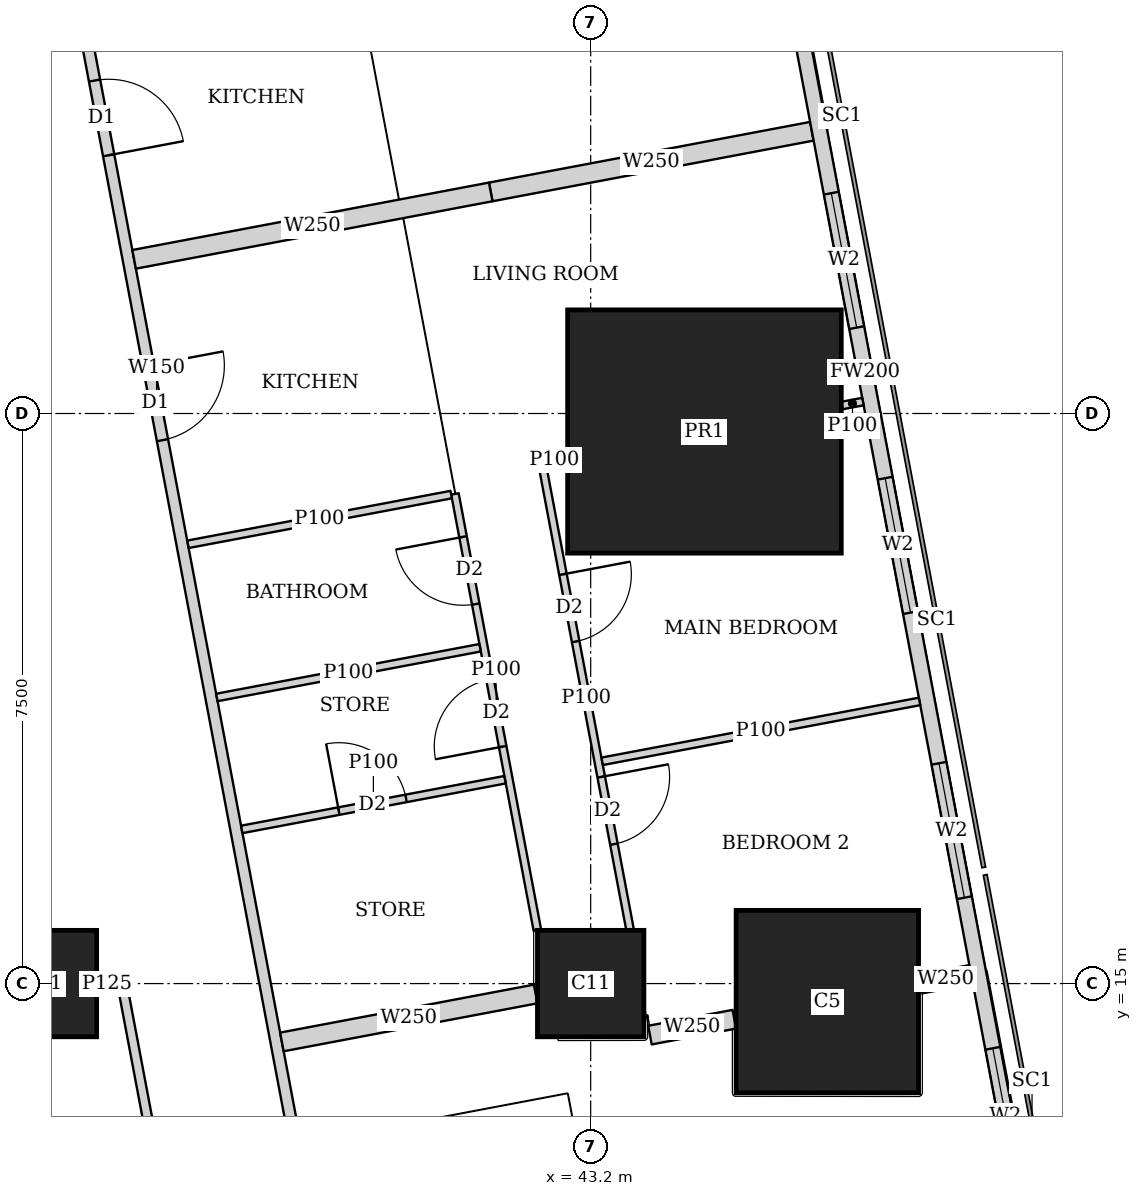
"""IFC4 building model, lengths in metres.
Left out: names, types, materials, properties, quantities, classifications, styles, units other than length and angle.
Written with IfcOpenShell. Run it as: python <this file> out.ifc"""

import sys

from ifc_helpers import new_model, si_unit, direction, frame, frame_2d, origin, origin_2d, place, context, subcontext, project, spatial, rectangle, extrude, element, fill, save


model = new_model("IFC4")
c1 = context("Model", 3, precision=1e-05, world=origin(), true_north=direction((0.0, 1.0)))
c2 = subcontext(c1, "Body", "Model", "MODEL_VIEW")
j1 = project(units=[si_unit("LENGTHUNIT", "METRE"), si_unit("PLANEANGLEUNIT", "RADIAN")], contexts=[c1])
p1 = place(None, origin())
s1 = spatial("IfcSite", under=j1, at=p1, CompositionType="ELEMENT")
p2 = place(p1, origin())
s2 = spatial("IfcBuilding", under=s1, at=p2, CompositionType="ELEMENT")
p3 = place(p2, frame((0.0, 0.0, 227.45)))
s3 = spatial("IfcBuildingStorey", under=s2, at=p3, CompositionType="ELEMENT", Elevation=227.45)
for number, where, z_axis, x_axis in (
    (1, (36.0, 15.0, 0.0), (0.0, 0.0, 1.0), (1.0, 0.0, 0.0)),
    (2, (43.2, 15.0, 0.0), (0.0, 0.0, 1.0), (1.0, 0.0, 0.0)),
):
    element("IfcColumn", number, at=place(p3, frame(where, z_axis=z_axis, x_axis=x_axis)), inside=s3, PredefinedType="COLUMN", context=c2, shape_type="SweptSolid", body=[
        extrude(rectangle(XDim=1.4, YDim=1.4, at=origin_2d()), origin(), (0.0, 0.0, 1.0), 3.75),
    ])
p4 = place(p3, frame((46.314, 14.763, 0.0), z_axis=(0.0, 0.0, 1.0), x_axis=(1.0, 0.0, 0.0)))
e3 = element("IfcColumn", 3, at=p4, inside=s3, PredefinedType="COLUMN", context=c2, shape_type="SweptSolid", body=[
    extrude(rectangle(XDim=2.4, YDim=2.4, at=origin_2d()), origin(), (0.0, 0.0, 1.0), 3.75),
])
p5 = place(p3, frame((44.697, 22.263, 0.0), z_axis=(0.0, 0.0, 1.0), x_axis=(1.0, 0.0, 0.0)))
e4 = element("IfcColumn", 4, at=p5, inside=s3, PredefinedType="COLUMN", context=c2, shape_type="SweptSolid", body=[
    extrude(rectangle(XDim=3.6, YDim=3.2, at=origin_2d()), origin(), (0.0, 0.0, 1.0), 3.75),
])
p6 = place(p3, frame((50.653, 2.703, 0.0), z_axis=(0.0, 0.0, 1.0), x_axis=(-0.185612026696, 0.982623109613, 0.0)))
e5 = element("IfcWall", 5, at=p6, inside=s3, PredefinedType="SOLIDWALL", context=c2, shape_type="SweptSolid", body=[
    extrude(rectangle(XDim=41.393, YDim=0.2, at=frame_2d((20.697, 0.0))), origin(), (0.0, 0.0, 1.0), 3.5),
])
p7 = place(p6, frame((1.633, 0.0, 0.9)))
e6 = element("IfcOpeningElement", 6, at=p7, cuts=e5, PredefinedType="OPENING", context=c2, shape_type="SweptSolid", body=[
    extrude(rectangle(XDim=1.8, YDim=1.5, at=frame_2d((0.9, 0.75))), frame((0.0, 0.11, 0.0), z_axis=(0.0, -1.0, 0.0), x_axis=(1.0, 0.0, 0.0)), (0.0, 0.0, 1.0), 0.22),
])
p8 = place(p6, frame((6.032, 0.0, 0.9)))
e7 = element("IfcOpeningElement", 7, at=p8, cuts=e5, PredefinedType="OPENING", context=c2, shape_type="SweptSolid", body=[
    extrude(rectangle(XDim=1.8, YDim=1.5, at=frame_2d((0.9, 0.75))), frame((0.0, 0.11, 0.0), z_axis=(0.0, -1.0, 0.0), x_axis=(1.0, 0.0, 0.0)), (0.0, 0.0, 1.0), 0.22),
])
p9 = place(p6, frame((9.848, 0.0, 0.9)))
e8 = element("IfcOpeningElement", 8, at=p9, cuts=e5, PredefinedType="OPENING", context=c2, shape_type="SweptSolid", body=[
    extrude(rectangle(XDim=1.8, YDim=1.5, at=frame_2d((0.9, 0.75))), frame((0.0, 0.11, 0.0), z_axis=(0.0, -1.0, 0.0), x_axis=(1.0, 0.0, 0.0)), (0.0, 0.0, 1.0), 0.22),
])
p10 = place(p6, frame((13.664, 0.0, 0.9)))
e9 = element("IfcOpeningElement", 9, at=p10, cuts=e5, PredefinedType="OPENING", context=c2, shape_type="SweptSolid", body=[
    extrude(rectangle(XDim=1.8, YDim=1.5, at=frame_2d((0.9, 0.75))), frame((0.0, 0.11, 0.0), z_axis=(0.0, -1.0, 0.0), x_axis=(1.0, 0.0, 0.0)), (0.0, 0.0, 1.0), 0.22),
])
p11 = place(p6, frame((17.481, 0.0, 0.9)))
e10 = element("IfcOpeningElement", 10, at=p11, cuts=e5, PredefinedType="OPENING", context=c2, shape_type="SweptSolid", body=[
    extrude(rectangle(XDim=1.8, YDim=1.5, at=frame_2d((0.9, 0.75))), frame((0.0, 0.11, 0.0), z_axis=(0.0, -1.0, 0.0), x_axis=(1.0, 0.0, 0.0)), (0.0, 0.0, 1.0), 0.22),
])
p12 = place(p6, frame((21.297, 0.0, 0.9)))
e11 = element("IfcOpeningElement", 11, at=p12, cuts=e5, PredefinedType="OPENING", context=c2, shape_type="SweptSolid", body=[
    extrude(rectangle(XDim=1.8, YDim=1.5, at=frame_2d((0.9, 0.75))), frame((0.0, 0.11, 0.0), z_axis=(0.0, -1.0, 0.0), x_axis=(1.0, 0.0, 0.0)), (0.0, 0.0, 1.0), 0.22),
])
p13 = place(p6, frame((25.113, 0.0, 0.9)))
e12 = element("IfcOpeningElement", 12, at=p13, cuts=e5, PredefinedType="OPENING", context=c2, shape_type="SweptSolid", body=[
    extrude(rectangle(XDim=1.8, YDim=1.5, at=frame_2d((0.9, 0.75))), frame((0.0, 0.11, 0.0), z_axis=(0.0, -1.0, 0.0), x_axis=(1.0, 0.0, 0.0)), (0.0, 0.0, 1.0), 0.22),
])
p14 = place(p6, frame((28.93, 0.0, 0.9)))
e13 = element("IfcOpeningElement", 13, at=p14, cuts=e5, PredefinedType="OPENING", context=c2, shape_type="SweptSolid", body=[
    extrude(rectangle(XDim=1.8, YDim=1.5, at=frame_2d((0.9, 0.75))), frame((0.0, 0.11, 0.0), z_axis=(0.0, -1.0, 0.0), x_axis=(1.0, 0.0, 0.0)), (0.0, 0.0, 1.0), 0.22),
])
p15 = place(p6, frame((32.746, 0.0, 0.9)))
e14 = element("IfcOpeningElement", 14, at=p15, cuts=e5, PredefinedType="OPENING", context=c2, shape_type="SweptSolid", body=[
    extrude(rectangle(XDim=1.8, YDim=1.5, at=frame_2d((0.9, 0.75))), frame((0.0, 0.11, 0.0), z_axis=(0.0, -1.0, 0.0), x_axis=(1.0, 0.0, 0.0)), (0.0, 0.0, 1.0), 0.22),
])
p16 = place(p6, frame((36.481, 0.0, 0.9)))
e15 = element("IfcOpeningElement", 15, at=p16, cuts=e5, PredefinedType="OPENING", context=c2, shape_type="SweptSolid", body=[
    extrude(rectangle(XDim=1.8, YDim=1.5, at=frame_2d((0.9, 0.75))), frame((0.0, 0.11, 0.0), z_axis=(0.0, -1.0, 0.0), x_axis=(1.0, 0.0, 0.0)), (0.0, 0.0, 1.0), 0.22),
])
p17 = place(p3, frame((33.68, 42.723, 0.0), z_axis=(0.0, 0.0, 1.0), x_axis=(0.185601160014, -0.982625162207, 0.0)))
e16 = element("IfcWall", 16, at=p17, inside=s3, PredefinedType="SOLIDWALL", context=c2, shape_type="SweptSolid", body=[
    extrude(rectangle(XDim=41.051, YDim=0.15, at=frame_2d((20.526, 0.0))), origin(), (0.0, 0.0, 1.0), 2.5),
])
p18 = place(p17, frame((16.123, 0.0, 0.0)))
e17 = element("IfcOpeningElement", 17, at=p18, cuts=e16, PredefinedType="OPENING", context=c2, shape_type="SweptSolid", body=[
    extrude(rectangle(XDim=1.0, YDim=2.1, at=frame_2d((0.5, 1.05))), frame((0.0, 0.085, 0.0), z_axis=(0.0, -1.0, 0.0), x_axis=(1.0, 0.0, 0.0)), (0.0, 0.0, 1.0), 0.17),
])
p19 = place(p17, frame((19.938, 0.0, 0.0)))
e18 = element("IfcOpeningElement", 18, at=p19, cuts=e16, PredefinedType="OPENING", context=c2, shape_type="SweptSolid", body=[
    extrude(rectangle(XDim=1.0, YDim=2.1, at=frame_2d((0.5, 1.05))), frame((0.0, 0.085, 0.0), z_axis=(0.0, -1.0, 0.0), x_axis=(1.0, 0.0, 0.0)), (0.0, 0.0, 1.0), 0.17),
])
p20 = place(p17, frame((30.902, 0.0, 0.0)))
e19 = element("IfcOpeningElement", 19, at=p20, cuts=e16, PredefinedType="OPENING", context=c2, shape_type="SweptSolid", body=[
    extrude(rectangle(XDim=1.0, YDim=2.1, at=frame_2d((0.5, 1.05))), frame((0.0, 0.085, 0.0), z_axis=(0.0, -1.0, 0.0), x_axis=(1.0, 0.0, 0.0)), (0.0, 0.0, 1.0), 0.17),
])
p21 = place(p3, frame((42.566, 21.809, 0.0), z_axis=(0.0, 0.0, 1.0), x_axis=(0.185613526435, -0.98262282632, 0.0)))
e20 = element("IfcWall", 20, at=p21, inside=s3, PredefinedType="PARTITIONING", context=c2, shape_type="SweptSolid", body=[
    extrude(rectangle(XDim=6.207, YDim=0.1, at=frame_2d((3.104, 0.0))), origin(), (0.0, 0.0, 1.0), 2.5),
])
p22 = place(p21, frame((1.45, 0.0, 0.0)))
e21 = element("IfcOpeningElement", 21, at=p22, cuts=e20, PredefinedType="OPENING", context=c2, shape_type="SweptSolid", body=[
    extrude(rectangle(XDim=0.9, YDim=2.1, at=frame_2d((0.45, 1.05))), frame((0.0, 0.06, 0.0), z_axis=(0.0, -1.0, 0.0), x_axis=(1.0, 0.0, 0.0)), (0.0, 0.0, 1.0), 0.12),
])
p23 = place(p21, frame((4.163, 0.0, 0.0)))
e22 = element("IfcOpeningElement", 22, at=p23, cuts=e20, PredefinedType="OPENING", context=c2, shape_type="SweptSolid", body=[
    extrude(rectangle(XDim=0.9, YDim=2.1, at=frame_2d((0.45, 1.05))), frame((0.0, 0.06, 0.0), z_axis=(0.0, -1.0, 0.0), x_axis=(1.0, 0.0, 0.0)), (0.0, 0.0, 1.0), 0.12),
])
p24 = place(p3, frame((41.414, 21.442, 0.0), z_axis=(0.0, 0.0, 1.0), x_axis=(0.185698675093, -0.982606738257, 0.0)))
e23 = element("IfcWall", 23, at=p24, inside=s3, PredefinedType="PARTITIONING", context=c2, shape_type="SweptSolid", body=[
    extrude(rectangle(XDim=5.843, YDim=0.1, at=frame_2d((2.921, 0.0))), origin(), (0.0, 0.0, 1.0), 3.5),
])
p25 = place(p24, frame((0.575, 0.0, 0.0)))
e24 = element("IfcOpeningElement", 24, at=p25, cuts=e23, PredefinedType="OPENING", context=c2, shape_type="SweptSolid", body=[
    extrude(rectangle(XDim=0.9, YDim=2.1, at=frame_2d((0.45, 1.05))), frame((0.0, 0.06, 0.0), z_axis=(0.0, -1.0, 0.0), x_axis=(1.0, 0.0, 0.0)), (0.0, 0.0, 1.0), 0.12),
])
p26 = place(p24, frame((2.483, 0.0, 0.0)))
e25 = element("IfcOpeningElement", 25, at=p26, cuts=e23, PredefinedType="OPENING", context=c2, shape_type="SweptSolid", body=[
    extrude(rectangle(XDim=0.9, YDim=2.1, at=frame_2d((0.45, 1.05))), frame((0.0, 0.06, 0.0), z_axis=(0.0, -1.0, 0.0), x_axis=(1.0, 0.0, 0.0)), (0.0, 0.0, 1.0), 0.12),
])
p27 = place(p3, frame((46.782, 22.657, 0.0), z_axis=(0.0, 0.0, 1.0), x_axis=(-0.982574553168, -0.185868898601, 0.0)))
e26 = element("IfcWall", 26, at=p27, inside=s3, PredefinedType="PARTITIONING", context=c2, shape_type="SweptSolid", body=[
    extrude(rectangle(XDim=0.28, YDim=0.1, at=frame_2d((0.14, 0.0))), origin(), (0.0, 0.0, 1.0), 3.5),
])
p28 = place(p3, frame((42.887, 21.921, 0.0), z_axis=(0.0, 0.0, 1.0), x_axis=(-0.982274918032, -0.187445953293, 0.0)))
e27 = element("IfcWall", 27, at=p28, inside=s3, PredefinedType="PARTITIONING", context=c2, shape_type="SweptSolid", body=[
    extrude(rectangle(XDim=0.336, YDim=0.1, at=frame_2d((0.168, 0.0))), origin(), (0.0, 0.0, 1.0), 2.5),
])
p29 = place(p3, frame((47.527, 18.712, 0.0), z_axis=(0.0, 0.0, 1.0), x_axis=(-0.982665405803, -0.185387972203, 0.0)))
e28 = element("IfcWall", 28, at=p29, inside=s3, PredefinedType="PARTITIONING", context=c2, shape_type="SweptSolid", body=[
    extrude(rectangle(XDim=4.25, YDim=0.1, at=frame_2d((2.125, 0.0))), origin(), (0.0, 0.0, 1.0), 2.05),
])
p30 = place(p3, frame((41.365, 21.433, 0.0), z_axis=(0.0, 0.0, 1.0), x_axis=(-0.982638553676, -0.185530247748, 0.0)))
e29 = element("IfcWall", 29, at=p30, inside=s3, PredefinedType="PARTITIONING", context=c2, shape_type="SweptSolid", body=[
    extrude(rectangle(XDim=3.525, YDim=0.1, at=frame_2d((1.763, 0.0))), origin(), (0.0, 0.0, 1.0), 3.5),
])
p31 = place(p3, frame((42.073, 17.682, 0.0), z_axis=(0.0, 0.0, 1.0), x_axis=(-0.98265117712, -0.185463376723, 0.0)))
e30 = element("IfcWall", 30, at=p31, inside=s3, PredefinedType="PARTITIONING", context=c2, shape_type="SweptSolid", body=[
    extrude(rectangle(XDim=3.525, YDim=0.1, at=frame_2d((1.763, 0.0))), origin(), (0.0, 0.0, 1.0), 3.5),
])
p32 = place(p31, frame((1.325, 0.0, 0.0)))
e31 = element("IfcOpeningElement", 31, at=p32, cuts=e30, PredefinedType="OPENING", context=c2, shape_type="SweptSolid", body=[
    extrude(rectangle(XDim=0.9, YDim=2.1, at=frame_2d((0.45, 1.05))), frame((0.0, 0.06, 0.0), z_axis=(0.0, -1.0, 0.0), x_axis=(1.0, 0.0, 0.0)), (0.0, 0.0, 1.0), 0.12),
])
p33 = place(p3, frame((41.745, 19.418, 0.0), z_axis=(0.0, 0.0, 1.0), x_axis=(-0.982638553676, -0.185530247748, 0.0)))
e32 = element("IfcWall", 32, at=p33, inside=s3, PredefinedType="PARTITIONING", context=c2, shape_type="SweptSolid", body=[
    extrude(rectangle(XDim=3.525, YDim=0.1, at=frame_2d((1.763, 0.0))), origin(), (0.0, 0.0, 1.0), 3.5),
])
p34 = place(p3, frame((46.11, 26.213, 0.0), z_axis=(0.0, 0.0, 1.0), x_axis=(-0.982633535512, -0.185556823879, 0.0)))
e33 = element("IfcWall", 33, at=p34, inside=s3, PredefinedType="SOLIDWALL", context=c2, shape_type="SweptSolid", body=[
    extrude(rectangle(XDim=4.3, YDim=0.25, at=frame_2d((2.15, 0.0))), origin(), (0.0, 0.0, 1.0), 2.05),
])
p35 = place(p3, frame((41.885, 25.415, 0.0), z_axis=(0.0, 0.0, 1.0), x_axis=(-0.982596737686, -0.185751584349, 0.0)))
e34 = element("IfcWall", 34, at=p35, inside=s3, PredefinedType="SOLIDWALL", context=c2, shape_type="SweptSolid", body=[
    extrude(rectangle(XDim=4.775, YDim=0.25, at=frame_2d((2.387, 0.0))), origin(), (0.0, 0.0, 1.0), 3.5),
])
p36 = place(p3, frame((48.206, 15.12, 0.0), z_axis=(0.0, 0.0, 1.0), x_axis=(-0.982610999048, -0.18567612811, 0.0)))
e35 = element("IfcWall", 35, at=p36, inside=s3, PredefinedType="SOLIDWALL", context=c2, shape_type="SweptSolid", body=[
    extrude(rectangle(XDim=0.68, YDim=0.25, at=frame_2d((0.34, 0.0))), origin(), (0.0, 0.0, 1.0), 2.05),
])
p37 = place(p3, frame((45.09, 14.531, 0.0), z_axis=(0.0, 0.0, 1.0), x_axis=(-0.982737354171, -0.185006196431, 0.0)))
e36 = element("IfcWall", 36, at=p37, inside=s3, PredefinedType="SOLIDWALL", context=c2, shape_type="SweptSolid", body=[
    extrude(rectangle(XDim=1.13, YDim=0.25, at=frame_2d((0.565, 0.0))), origin(), (0.0, 0.0, 1.0), 2.05),
])
p38 = place(p3, frame((42.476, 14.863, 0.0), z_axis=(0.0, 0.0, 1.0), x_axis=(-0.982603567712, -0.185715450942, 0.0)))
e37 = element("IfcWall", 37, at=p38, inside=s3, PredefinedType="SOLIDWALL", context=c2, shape_type="SweptSolid", body=[
    extrude(rectangle(XDim=3.398, YDim=0.25, at=frame_2d((1.699, 0.0))), origin(), (0.0, 0.0, 1.0), 3.5),
])
p39 = place(p3, frame((37.9, 10.413, 0.0), z_axis=(0.0, 0.0, 1.0), x_axis=(-0.185513629891, 0.982641691119, 0.0)))
e38 = element("IfcWall", 38, at=p39, inside=s3, PredefinedType="PARTITIONING", context=c2, shape_type="SweptSolid", body=[
    extrude(rectangle(XDim=4.668, YDim=0.125, at=frame_2d((2.334, 0.0))), origin(), (0.0, 0.0, 1.0), 3.5),
])
p40 = place(p39, frame((0.708, 0.0, 0.0)))
e39 = element("IfcOpeningElement", 39, at=p40, cuts=e38, PredefinedType="OPENING", context=c2, shape_type="SweptSolid", body=[
    extrude(rectangle(XDim=1.0, YDim=2.1, at=frame_2d((0.5, 1.05))), frame((0.0, 0.073, 0.0), z_axis=(0.0, -1.0, 0.0), x_axis=(1.0, 0.0, 0.0)), (0.0, 0.0, 1.0), 0.145),
])
p41 = place(p3, frame((36.701, 15.0, 0.0), z_axis=(0.0, 0.0, 1.0), x_axis=(1.0, 0.0, 0.0)))
e40 = element("IfcWall", 40, at=p41, inside=s3, PredefinedType="PARTITIONING", context=c2, shape_type="SweptSolid", body=[
    extrude(rectangle(XDim=0.272, YDim=0.125, at=frame_2d((0.136, 0.0))), origin(), (0.0, 0.0, 1.0), 3.5),
])
p42 = place(p9, origin())
e41 = element("IfcWindow", 41, at=p42, inside=s3, PartitioningType="SINGLE_PANEL", PredefinedType="WINDOW", context=c2, shape_type="SweptSolid", body=[
    extrude(rectangle(XDim=1.8, YDim=1.5, at=frame_2d((0.9, 0.75))), frame((0.0, 0.03, 0.0), z_axis=(0.0, -1.0, 0.0), x_axis=(1.0, 0.0, 0.0)), (0.0, 0.0, 1.0), 0.06),
])
fill(e8, e41)
p43 = place(p10, origin())
e42 = element("IfcWindow", 42, at=p43, inside=s3, PartitioningType="SINGLE_PANEL", PredefinedType="WINDOW", context=c2, shape_type="SweptSolid", body=[
    extrude(rectangle(XDim=1.8, YDim=1.5, at=frame_2d((0.9, 0.75))), frame((0.0, 0.03, 0.0), z_axis=(0.0, -1.0, 0.0), x_axis=(1.0, 0.0, 0.0)), (0.0, 0.0, 1.0), 0.06),
])
fill(e9, e42)
p44 = place(p11, origin())
e43 = element("IfcWindow", 43, at=p44, inside=s3, PartitioningType="SINGLE_PANEL", PredefinedType="WINDOW", context=c2, shape_type="SweptSolid", body=[
    extrude(rectangle(XDim=1.8, YDim=1.5, at=frame_2d((0.9, 0.75))), frame((0.0, 0.03, 0.0), z_axis=(0.0, -1.0, 0.0), x_axis=(1.0, 0.0, 0.0)), (0.0, 0.0, 1.0), 0.06),
])
fill(e10, e43)
p45 = place(p12, origin())
e44 = element("IfcWindow", 44, at=p45, inside=s3, PartitioningType="SINGLE_PANEL", PredefinedType="WINDOW", context=c2, shape_type="SweptSolid", body=[
    extrude(rectangle(XDim=1.8, YDim=1.5, at=frame_2d((0.9, 0.75))), frame((0.0, 0.03, 0.0), z_axis=(0.0, -1.0, 0.0), x_axis=(1.0, 0.0, 0.0)), (0.0, 0.0, 1.0), 0.06),
])
fill(e11, e44)
p46 = place(p18, origin())
e45 = element("IfcDoor", 45, at=p46, inside=s3, OperationType="SINGLE_SWING_RIGHT", PredefinedType="DOOR", context=c2, shape_type="SweptSolid", body=[
    extrude(rectangle(XDim=1.0, YDim=2.1, at=frame_2d((0.5, 1.05))), frame((0.0, 0.025, 0.0), z_axis=(0.0, -1.0, 0.0), x_axis=(1.0, 0.0, 0.0)), (0.0, 0.0, 1.0), 0.05),
])
fill(e17, e45)
p47 = place(p22, origin())
e46 = element("IfcDoor", 46, at=p47, inside=s3, OperationType="SINGLE_SWING_LEFT", PredefinedType="DOOR", context=c2, shape_type="SweptSolid", body=[
    extrude(rectangle(XDim=0.9, YDim=2.1, at=frame_2d((0.45, 1.05))), frame((0.0, 0.025, 0.0), z_axis=(0.0, -1.0, 0.0), x_axis=(1.0, 0.0, 0.0)), (0.0, 0.0, 1.0), 0.05),
])
fill(e21, e46)
p48 = place(p23, origin())
e47 = element("IfcDoor", 47, at=p48, inside=s3, OperationType="SINGLE_SWING_LEFT", PredefinedType="DOOR", context=c2, shape_type="SweptSolid", body=[
    extrude(rectangle(XDim=0.9, YDim=2.1, at=frame_2d((0.45, 1.05))), frame((0.0, 0.025, 0.0), z_axis=(0.0, -1.0, 0.0), x_axis=(1.0, 0.0, 0.0)), (0.0, 0.0, 1.0), 0.05),
])
fill(e22, e47)
p49 = place(p25, origin())
e48 = element("IfcDoor", 48, at=p49, inside=s3, OperationType="SINGLE_SWING_RIGHT", PredefinedType="DOOR", context=c2, shape_type="SweptSolid", body=[
    extrude(rectangle(XDim=0.9, YDim=2.1, at=frame_2d((0.45, 1.05))), frame((0.0, 0.025, 0.0), z_axis=(0.0, -1.0, 0.0), x_axis=(1.0, 0.0, 0.0)), (0.0, 0.0, 1.0), 0.05),
])
fill(e24, e48)
p50 = place(p26, origin())
e49 = element("IfcDoor", 49, at=p50, inside=s3, OperationType="SINGLE_SWING_LEFT", PredefinedType="DOOR", context=c2, shape_type="SweptSolid", body=[
    extrude(rectangle(XDim=0.9, YDim=2.1, at=frame_2d((0.45, 1.05))), frame((0.0, 0.025, 0.0), z_axis=(0.0, -1.0, 0.0), x_axis=(1.0, 0.0, 0.0)), (0.0, 0.0, 1.0), 0.05),
])
fill(e25, e49)
p51 = place(p19, origin())
e50 = element("IfcDoor", 50, at=p51, inside=s3, OperationType="SINGLE_SWING_LEFT", PredefinedType="DOOR", context=c2, shape_type="SweptSolid", body=[
    extrude(rectangle(XDim=1.0, YDim=2.1, at=frame_2d((0.5, 1.05))), frame((0.0, 0.025, 0.0), z_axis=(0.0, -1.0, 0.0), x_axis=(1.0, 0.0, 0.0)), (0.0, 0.0, 1.0), 0.05),
])
fill(e18, e50)
p52 = place(p32, origin())
e51 = element("IfcDoor", 51, at=p52, inside=s3, OperationType="SINGLE_SWING_LEFT", PredefinedType="DOOR", context=c2, shape_type="SweptSolid", body=[
    extrude(rectangle(XDim=0.9, YDim=2.1, at=frame_2d((0.45, 1.05))), frame((0.0, 0.025, 0.0), z_axis=(0.0, -1.0, 0.0), x_axis=(1.0, 0.0, 0.0)), (0.0, 0.0, 1.0), 0.05),
])
fill(e31, e51)
save(model, sys.argv[1])
